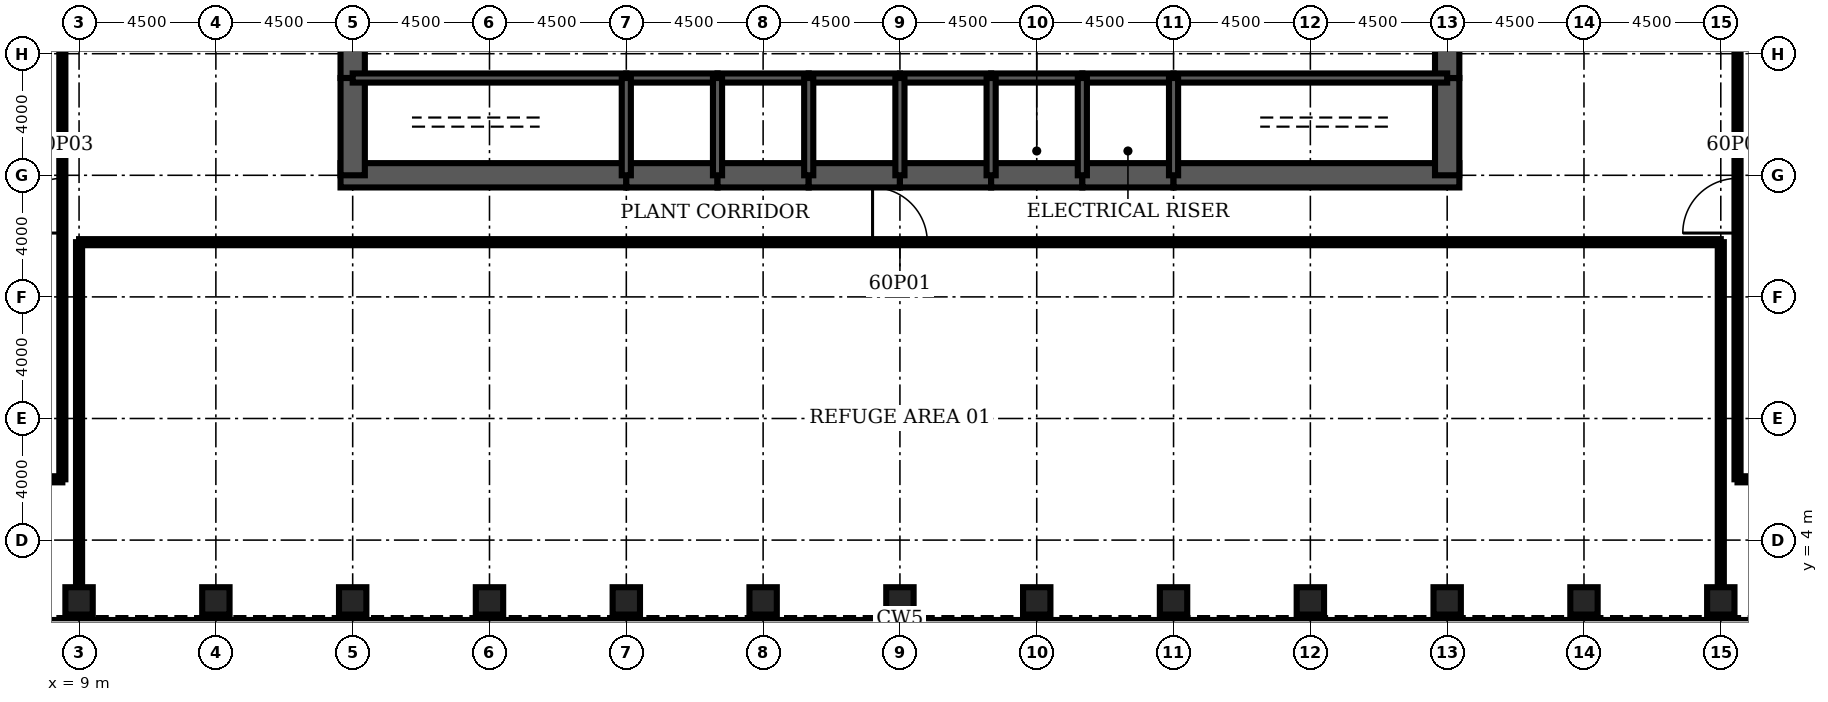
"""IFC4 building model, lengths in metres.
Left out: names, types, materials, properties, quantities, classifications, styles, units other than length and angle.
Written with IfcOpenShell. Run it as: python <this file> out.ifc"""

import sys

from ifc_helpers import new_model, si_unit, direction, frame, frame_2d, origin, origin_2d, place, context, subcontext, project, spatial, rectangle, hollow_rectangle, extrude, element, fill, save


model = new_model("IFC4")
c1 = context("Model", 3, precision=1e-05, world=origin(), true_north=direction((0.0, 1.0)))
c2 = subcontext(c1, "Body", "Model", "MODEL_VIEW")
j1 = project(units=[si_unit("LENGTHUNIT", "METRE"), si_unit("PLANEANGLEUNIT", "RADIAN")], contexts=[c1])
p1 = place(None, origin())
s1 = spatial("IfcSite", under=j1, at=p1, CompositionType="ELEMENT")
p2 = place(p1, origin())
s2 = spatial("IfcBuilding", under=s1, at=p2, CompositionType="ELEMENT")
p3 = place(p2, frame((0.0, 0.0, 265.6)))
s3 = spatial("IfcBuildingStorey", under=s2, at=p3, CompositionType="ELEMENT", Elevation=265.6)
for number, where, z_axis, x_axis in (
    (1, (9.0, 2.0, 0.0), (0.0, 0.0, 1.0), (0.0, 1.0, 0.0)),
    (2, (13.5, 2.0, 0.0), (0.0, 0.0, 1.0), (0.0, 1.0, 0.0)),
    (3, (18.0, 2.0, 0.0), (0.0, 0.0, 1.0), (0.0, 1.0, 0.0)),
    (4, (22.5, 2.0, 0.0), (0.0, 0.0, 1.0), (0.0, 1.0, 0.0)),
    (5, (27.0, 2.0, 0.0), (0.0, 0.0, 1.0), (0.0, 1.0, 0.0)),
    (6, (31.5, 2.0, 0.0), (0.0, 0.0, 1.0), (0.0, 1.0, 0.0)),
    (7, (36.0, 2.0, 0.0), (0.0, 0.0, 1.0), (0.0, 1.0, 0.0)),
    (8, (40.5, 2.0, 0.0), (0.0, 0.0, 1.0), (0.0, 1.0, 0.0)),
    (9, (45.0, 2.0, 0.0), (0.0, 0.0, 1.0), (0.0, 1.0, 0.0)),
    (10, (49.5, 2.0, 0.0), (0.0, 0.0, 1.0), (0.0, 1.0, 0.0)),
    (11, (54.0, 2.0, 0.0), (0.0, 0.0, 1.0), (0.0, 1.0, 0.0)),
    (12, (58.5, 2.0, 0.0), (0.0, 0.0, 1.0), (0.0, 1.0, 0.0)),
    (13, (63.0, 2.0, 0.0), (0.0, 0.0, 1.0), (0.0, 1.0, 0.0)),
):
    element("IfcColumn", number, at=place(p3, frame(where, z_axis=z_axis, x_axis=x_axis)), inside=s3, PredefinedType="COLUMN", context=c2, shape_type="SweptSolid", body=[
        extrude(hollow_rectangle(XDim=0.9, YDim=0.9, WallThickness=0.07, at=origin_2d()), origin(), (0.0, 0.0, 1.0), 5.5),
    ])
p4 = place(p3, frame((17.6, 16.0, 0.0), z_axis=(0.0, 0.0, 1.0), x_axis=(1.0, 0.0, 0.0)))
e14 = element("IfcWall", 14, at=p4, inside=s3, PredefinedType="SHEAR", context=c2, shape_type="SweptSolid", body=[
    extrude(rectangle(XDim=9.4, YDim=0.8, at=frame_2d((4.7, 0.0))), origin(), (0.0, 0.0, 1.0), 5.5),
])
for number, where, z_axis, x_axis in (
    (15, (27.0, 16.0, 0.0), (0.0, 0.0, 1.0), (1.0, 0.0, 0.0)),
    (16, (30.0, 16.0, 0.0), (0.0, 0.0, 1.0), (1.0, 0.0, 0.0)),
    (17, (33.0, 16.0, 0.0), (0.0, 0.0, 1.0), (1.0, 0.0, 0.0)),
    (18, (36.0, 16.0, 0.0), (0.0, 0.0, 1.0), (1.0, 0.0, 0.0)),
    (19, (39.0, 16.0, 0.0), (0.0, 0.0, 1.0), (1.0, 0.0, 0.0)),
    (20, (42.0, 16.0, 0.0), (0.0, 0.0, 1.0), (1.0, 0.0, 0.0)),
):
    element("IfcWall", number, at=place(p3, frame(where, z_axis=z_axis, x_axis=x_axis)), inside=s3, PredefinedType="SHEAR", context=c2, shape_type="SweptSolid", body=[
        extrude(rectangle(XDim=3.0, YDim=0.8, at=frame_2d((1.5, 0.0))), origin(), (0.0, 0.0, 1.0), 5.5),
    ])
p5 = place(p3, frame((45.0, 16.0, 0.0), z_axis=(0.0, 0.0, 1.0), x_axis=(1.0, 0.0, 0.0)))
e21 = element("IfcWall", 21, at=p5, inside=s3, PredefinedType="SHEAR", context=c2, shape_type="SweptSolid", body=[
    extrude(rectangle(XDim=9.4, YDim=0.8, at=frame_2d((4.7, 0.0))), origin(), (0.0, 0.0, 1.0), 5.5),
])
p6 = place(p3, frame((18.0, 22.0, 0.0), z_axis=(0.0, 0.0, 1.0), x_axis=(0.0, -1.0, 0.0)))
e22 = element("IfcWall", 22, at=p6, inside=s3, PredefinedType="SHEAR", context=c2, shape_type="SweptSolid", body=[
    extrude(rectangle(XDim=2.8, YDim=0.8, at=frame_2d((1.4, 0.0))), origin(), (0.0, 0.0, 1.0), 5.5),
])
p7 = place(p6, frame((0.6, 0.0, 0.0)))
e23 = element("IfcOpeningElement", 23, at=p7, cuts=e22, PredefinedType="OPENING", context=c2, shape_type="SweptSolid", body=[
    extrude(rectangle(XDim=1.8, YDim=2.1, at=frame_2d((0.9, 1.05))), frame((0.0, 0.41, 0.0), z_axis=(0.0, -1.0, 0.0), x_axis=(1.0, 0.0, 0.0)), (0.0, 0.0, 1.0), 0.82),
])
for number, where, z_axis, x_axis in (
    (24, (18.0, 19.2, 0.0), (0.0, 0.0, 1.0), (0.0, -1.0, 0.0)),
    (25, (54.0, 16.0, 0.0), (0.0, 0.0, 1.0), (0.0, 1.0, 0.0)),
):
    element("IfcWall", number, at=place(p3, frame(where, z_axis=z_axis, x_axis=x_axis)), inside=s3, PredefinedType="SHEAR", context=c2, shape_type="SweptSolid", body=[
        extrude(rectangle(XDim=3.2, YDim=0.8, at=frame_2d((1.6, 0.0))), origin(), (0.0, 0.0, 1.0), 5.5),
    ])
p8 = place(p3, frame((54.0, 19.2, 0.0), z_axis=(0.0, 0.0, 1.0), x_axis=(0.0, 1.0, 0.0)))
e26 = element("IfcWall", 26, at=p8, inside=s3, PredefinedType="SHEAR", context=c2, shape_type="SweptSolid", body=[
    extrude(rectangle(XDim=2.8, YDim=0.8, at=frame_2d((1.4, 0.0))), origin(), (0.0, 0.0, 1.0), 5.5),
])
p9 = place(p8, frame((0.4, 0.0, 0.0)))
e27 = element("IfcOpeningElement", 27, at=p9, cuts=e26, PredefinedType="OPENING", context=c2, shape_type="SweptSolid", body=[
    extrude(rectangle(XDim=1.8, YDim=2.1, at=frame_2d((0.9, 1.05))), frame((0.0, 0.41, 0.0), z_axis=(0.0, -1.0, 0.0), x_axis=(1.0, 0.0, 0.0)), (0.0, 0.0, 1.0), 0.82),
])
p10 = place(p3, frame((18.0, 19.2, 0.0), z_axis=(0.0, 0.0, 1.0), x_axis=(1.0, 0.0, 0.0)))
e28 = element("IfcWall", 28, at=p10, inside=s3, PredefinedType="SOLIDWALL", context=c2, shape_type="SweptSolid", body=[
    extrude(rectangle(XDim=9.0, YDim=0.3, at=frame_2d((4.5, 0.0))), origin(), (0.0, 0.0, 1.0), 5.5),
])
p11 = place(p10, frame((0.65, 0.0, 0.0)))
e29 = element("IfcOpeningElement", 29, at=p11, cuts=e28, PredefinedType="OPENING", context=c2, shape_type="SweptSolid", body=[
    extrude(rectangle(XDim=1.0, YDim=2.1, at=frame_2d((0.5, 1.05))), frame((0.0, 0.16, 0.0), z_axis=(0.0, -1.0, 0.0), x_axis=(1.0, 0.0, 0.0)), (0.0, 0.0, 1.0), 0.32),
])
p12 = place(p3, frame((27.0, 19.2, 0.0), z_axis=(0.0, 0.0, 1.0), x_axis=(1.0, 0.0, 0.0)))
e30 = element("IfcWall", 30, at=p12, inside=s3, PredefinedType="SOLIDWALL", context=c2, shape_type="SweptSolid", body=[
    extrude(rectangle(XDim=3.0, YDim=0.3, at=frame_2d((1.5, 0.0))), origin(), (0.0, 0.0, 1.0), 5.5),
])
p13 = place(p12, frame((0.95, 0.0, 0.0)))
e31 = element("IfcOpeningElement", 31, at=p13, cuts=e30, PredefinedType="OPENING", context=c2, shape_type="SweptSolid", body=[
    extrude(rectangle(XDim=1.1, YDim=2.2, at=frame_2d((0.55, 1.1))), frame((0.0, 0.16, 0.0), z_axis=(0.0, -1.0, 0.0), x_axis=(1.0, 0.0, 0.0)), (0.0, 0.0, 1.0), 0.32),
])
for number, where, z_axis, x_axis in (
    (32, (30.0, 19.2, 0.0), (0.0, 0.0, 1.0), (1.0, 0.0, 0.0)),
    (33, (33.0, 19.2, 0.0), (0.0, 0.0, 1.0), (1.0, 0.0, 0.0)),
    (34, (36.0, 19.2, 0.0), (0.0, 0.0, 1.0), (1.0, 0.0, 0.0)),
):
    element("IfcWall", number, at=place(p3, frame(where, z_axis=z_axis, x_axis=x_axis)), inside=s3, PredefinedType="SOLIDWALL", context=c2, shape_type="SweptSolid", body=[
        extrude(rectangle(XDim=3.0, YDim=0.3, at=frame_2d((1.5, 0.0))), origin(), (0.0, 0.0, 1.0), 5.5),
    ])
p14 = place(p3, frame((39.0, 19.2, 0.0), z_axis=(0.0, 0.0, 1.0), x_axis=(1.0, 0.0, 0.0)))
e35 = element("IfcWall", 35, at=p14, inside=s3, PredefinedType="SOLIDWALL", context=c2, shape_type="SweptSolid", body=[
    extrude(rectangle(XDim=3.0, YDim=0.3, at=frame_2d((1.5, 0.0))), origin(), (0.0, 0.0, 1.0), 5.5),
])
p15 = place(p14, frame((1.0, 0.0, 0.0)))
e36 = element("IfcOpeningElement", 36, at=p15, cuts=e35, PredefinedType="OPENING", context=c2, shape_type="SweptSolid", body=[
    extrude(rectangle(XDim=1.0, YDim=2.1, at=frame_2d((0.5, 1.05))), frame((0.0, 0.16, 0.0), z_axis=(0.0, -1.0, 0.0), x_axis=(1.0, 0.0, 0.0)), (0.0, 0.0, 1.0), 0.32),
])
p16 = place(p3, frame((42.0, 19.2, 0.0), z_axis=(0.0, 0.0, 1.0), x_axis=(1.0, 0.0, 0.0)))
e37 = element("IfcWall", 37, at=p16, inside=s3, PredefinedType="SOLIDWALL", context=c2, shape_type="SweptSolid", body=[
    extrude(rectangle(XDim=3.0, YDim=0.3, at=frame_2d((1.5, 0.0))), origin(), (0.0, 0.0, 1.0), 5.5),
])
p17 = place(p16, frame((1.0, 0.0, 0.0)))
e38 = element("IfcOpeningElement", 38, at=p17, cuts=e37, PredefinedType="OPENING", context=c2, shape_type="SweptSolid", body=[
    extrude(rectangle(XDim=1.0, YDim=2.1, at=frame_2d((0.5, 1.05))), frame((0.0, 0.16, 0.0), z_axis=(0.0, -1.0, 0.0), x_axis=(1.0, 0.0, 0.0)), (0.0, 0.0, 1.0), 0.32),
])
p18 = place(p3, frame((45.0, 19.2, 0.0), z_axis=(0.0, 0.0, 1.0), x_axis=(1.0, 0.0, 0.0)))
e39 = element("IfcWall", 39, at=p18, inside=s3, PredefinedType="SOLIDWALL", context=c2, shape_type="SweptSolid", body=[
    extrude(rectangle(XDim=9.0, YDim=0.3, at=frame_2d((4.5, 0.0))), origin(), (0.0, 0.0, 1.0), 5.5),
])
p19 = place(p18, frame((7.35, 0.0, 0.0)))
e40 = element("IfcOpeningElement", 40, at=p19, cuts=e39, PredefinedType="OPENING", context=c2, shape_type="SweptSolid", body=[
    extrude(rectangle(XDim=1.0, YDim=2.1, at=frame_2d((0.5, 1.05))), frame((0.0, 0.16, 0.0), z_axis=(0.0, -1.0, 0.0), x_axis=(1.0, 0.0, 0.0)), (0.0, 0.0, 1.0), 0.32),
])
for number, where, z_axis, x_axis in (
    (41, (27.0, 16.0, 0.0), (0.0, 0.0, 1.0), (0.0, 1.0, 0.0)),
    (42, (30.0, 16.0, 0.0), (0.0, 0.0, 1.0), (0.0, 1.0, 0.0)),
    (43, (33.0, 16.0, 0.0), (0.0, 0.0, 1.0), (0.0, 1.0, 0.0)),
    (44, (36.0, 16.0, 0.0), (0.0, 0.0, 1.0), (0.0, 1.0, 0.0)),
    (45, (39.0, 16.0, 0.0), (0.0, 0.0, 1.0), (0.0, 1.0, 0.0)),
    (46, (42.0, 16.0, 0.0), (0.0, 0.0, 1.0), (0.0, 1.0, 0.0)),
    (47, (45.0, 16.0, 0.0), (0.0, 0.0, 1.0), (0.0, 1.0, 0.0)),
):
    element("IfcWall", number, at=place(p3, frame(where, z_axis=z_axis, x_axis=x_axis)), inside=s3, PredefinedType="SOLIDWALL", context=c2, shape_type="SweptSolid", body=[
        extrude(rectangle(XDim=3.2, YDim=0.3, at=frame_2d((1.6, 0.0))), origin(), (0.0, 0.0, 1.0), 5.5),
    ])
p20 = place(p3, frame((39.15, 17.35, 0.0), z_axis=(0.0, 0.0, 1.0), x_axis=(1.0, 0.0, 0.0)))
e48 = element("IfcWall", 48, at=p20, inside=s3, PredefinedType="SOLIDWALL", context=c2, shape_type="SweptSolid", body=[
    extrude(rectangle(XDim=2.7, YDim=0.3, at=frame_2d((1.35, 0.0))), origin(), (0.0, 0.0, 1.0), 5.34),
])
p21 = place(p20, frame((0.85, 0.0, 0.0)))
e49 = element("IfcOpeningElement", 49, at=p21, cuts=e48, PredefinedType="OPENING", context=c2, shape_type="SweptSolid", body=[
    extrude(rectangle(XDim=1.0, YDim=2.1, at=frame_2d((0.5, 1.05))), frame((0.0, 0.16, 0.0), z_axis=(0.0, -1.0, 0.0), x_axis=(1.0, 0.0, 0.0)), (0.0, 0.0, 1.0), 0.32),
])
p22 = place(p3, frame((42.15, 17.35, 0.0), z_axis=(0.0, 0.0, 1.0), x_axis=(1.0, 0.0, 0.0)))
e50 = element("IfcWall", 50, at=p22, inside=s3, PredefinedType="SOLIDWALL", context=c2, shape_type="SweptSolid", body=[
    extrude(rectangle(XDim=2.7, YDim=0.3, at=frame_2d((1.35, 0.0))), origin(), (0.0, 0.0, 1.0), 5.34),
])
p23 = place(p22, frame((0.85, 0.0, 0.0)))
e51 = element("IfcOpeningElement", 51, at=p23, cuts=e50, PredefinedType="OPENING", context=c2, shape_type="SweptSolid", body=[
    extrude(rectangle(XDim=1.0, YDim=2.1, at=frame_2d((0.5, 1.05))), frame((0.0, 0.16, 0.0), z_axis=(0.0, -1.0, 0.0), x_axis=(1.0, 0.0, 0.0)), (0.0, 0.0, 1.0), 0.32),
])
p24 = place(p3, frame((2.7, 6.0, 0.0), z_axis=(0.0, 0.0, 1.0), x_axis=(1.0, 0.0, 0.0)))
e52 = element("IfcWall", 52, at=p24, inside=s3, PredefinedType="PARTITIONING", context=c2, shape_type="SweptSolid", body=[
    extrude(rectangle(XDim=5.75, YDim=0.2, at=frame_2d((2.875, 0.0))), origin(), (0.0, 0.0, 1.0), 5.34),
])
p25 = place(p3, frame((63.55, 6.0, 0.0), z_axis=(0.0, 0.0, 1.0), x_axis=(1.0, 0.0, 0.0)))
e53 = element("IfcWall", 53, at=p25, inside=s3, PredefinedType="PARTITIONING", context=c2, shape_type="SweptSolid", body=[
    extrude(rectangle(XDim=3.95, YDim=0.2, at=frame_2d((1.975, 0.0))), origin(), (0.0, 0.0, 1.0), 5.34),
])
p26 = place(p3, frame((9.0, 13.8, 0.0), z_axis=(0.0, 0.0, 1.0), x_axis=(1.0, 0.0, 0.0)))
e54 = element("IfcWall", 54, at=p26, inside=s3, PredefinedType="PARTITIONING", context=c2, shape_type="SweptSolid", body=[
    extrude(rectangle(XDim=54.0, YDim=0.2, at=frame_2d((27.0, 0.0))), origin(), (0.0, 0.0, 1.0), 5.34),
])
p27 = place(p26, frame((26.1, 0.0, 0.0)))
e55 = element("IfcOpeningElement", 55, at=p27, cuts=e54, PredefinedType="OPENING", context=c2, shape_type="SweptSolid", body=[
    extrude(rectangle(XDim=1.8, YDim=2.1, at=frame_2d((0.9, 1.05))), frame((0.0, 0.11, 0.0), z_axis=(0.0, -1.0, 0.0), x_axis=(1.0, 0.0, 0.0)), (0.0, 0.0, 1.0), 0.22),
])
p28 = place(p3, frame((8.45, 6.0, 0.0), z_axis=(0.0, 0.0, 1.0), x_axis=(0.0, 1.0, 0.0)))
e56 = element("IfcWall", 56, at=p28, inside=s3, PredefinedType="PARTITIONING", context=c2, shape_type="SweptSolid", body=[
    extrude(rectangle(XDim=34.0, YDim=0.2, at=frame_2d((17.0, 0.0))), origin(), (0.0, 0.0, 1.0), 5.34),
])
p29 = place(p28, frame((8.1, 0.0, 0.0)))
e57 = element("IfcOpeningElement", 57, at=p29, cuts=e56, PredefinedType="OPENING", context=c2, shape_type="SweptSolid", body=[
    extrude(rectangle(XDim=1.8, YDim=2.1, at=frame_2d((0.9, 1.05))), frame((0.0, 0.11, 0.0), z_axis=(0.0, -1.0, 0.0), x_axis=(1.0, 0.0, 0.0)), (0.0, 0.0, 1.0), 0.22),
])
p30 = place(p28, frame((23.1, 0.0, 0.0)))
e58 = element("IfcOpeningElement", 58, at=p30, cuts=e56, PredefinedType="OPENING", context=c2, shape_type="SweptSolid", body=[
    extrude(rectangle(XDim=1.8, YDim=2.1, at=frame_2d((0.9, 1.05))), frame((0.0, 0.11, 0.0), z_axis=(0.0, -1.0, 0.0), x_axis=(1.0, 0.0, 0.0)), (0.0, 0.0, 1.0), 0.22),
])
p31 = place(p28, frame((31.5, 0.0, 0.0)))
e59 = element("IfcOpeningElement", 59, at=p31, cuts=e56, PredefinedType="OPENING", context=c2, shape_type="SweptSolid", body=[
    extrude(rectangle(XDim=1.0, YDim=2.1, at=frame_2d((0.5, 1.05))), frame((0.0, 0.11, 0.0), z_axis=(0.0, -1.0, 0.0), x_axis=(1.0, 0.0, 0.0)), (0.0, 0.0, 1.0), 0.22),
])
for number, where, z_axis, x_axis in (
    (60, (9.0, 2.45, 0.0), (0.0, 0.0, 1.0), (0.0, 1.0, 0.0)),
    (61, (63.0, 2.45, 0.0), (0.0, 0.0, 1.0), (0.0, 1.0, 0.0)),
):
    element("IfcWall", number, at=place(p3, frame(where, z_axis=z_axis, x_axis=x_axis)), inside=s3, PredefinedType="PARTITIONING", context=c2, shape_type="SweptSolid", body=[
        extrude(rectangle(XDim=11.35, YDim=0.2, at=frame_2d((5.675, 0.0))), origin(), (0.0, 0.0, 1.0), 5.34),
    ])
p32 = place(p3, frame((63.55, 6.0, 0.0), z_axis=(0.0, 0.0, 1.0), x_axis=(0.0, 1.0, 0.0)))
e62 = element("IfcWall", 62, at=p32, inside=s3, PredefinedType="PARTITIONING", context=c2, shape_type="SweptSolid", body=[
    extrude(rectangle(XDim=34.0, YDim=0.2, at=frame_2d((17.0, 0.0))), origin(), (0.0, 0.0, 1.0), 5.34),
])
p33 = place(p32, frame((8.1, 0.0, 0.0)))
e63 = element("IfcOpeningElement", 63, at=p33, cuts=e62, PredefinedType="OPENING", context=c2, shape_type="SweptSolid", body=[
    extrude(rectangle(XDim=1.8, YDim=2.1, at=frame_2d((0.9, 1.05))), frame((0.0, 0.11, 0.0), z_axis=(0.0, -1.0, 0.0), x_axis=(1.0, 0.0, 0.0)), (0.0, 0.0, 1.0), 0.22),
])
p34 = place(p32, frame((19.5, 0.0, 0.0)))
e64 = element("IfcOpeningElement", 64, at=p34, cuts=e62, PredefinedType="OPENING", context=c2, shape_type="SweptSolid", body=[
    extrude(rectangle(XDim=1.0, YDim=2.1, at=frame_2d((0.5, 1.05))), frame((0.0, 0.11, 0.0), z_axis=(0.0, -1.0, 0.0), x_axis=(1.0, 0.0, 0.0)), (0.0, 0.0, 1.0), 0.22),
])
p35 = place(p32, frame((25.1, 0.0, 0.0)))
e65 = element("IfcOpeningElement", 65, at=p35, cuts=e62, PredefinedType="OPENING", context=c2, shape_type="SweptSolid", body=[
    extrude(rectangle(XDim=1.8, YDim=2.1, at=frame_2d((0.9, 1.05))), frame((0.0, 0.11, 0.0), z_axis=(0.0, -1.0, 0.0), x_axis=(1.0, 0.0, 0.0)), (0.0, 0.0, 1.0), 0.22),
])
p36 = place(p32, frame((31.5, 0.0, 0.0)))
e66 = element("IfcOpeningElement", 66, at=p36, cuts=e62, PredefinedType="OPENING", context=c2, shape_type="SweptSolid", body=[
    extrude(rectangle(XDim=1.0, YDim=2.1, at=frame_2d((0.5, 1.05))), frame((0.0, 0.11, 0.0), z_axis=(0.0, -1.0, 0.0), x_axis=(1.0, 0.0, 0.0)), (0.0, 0.0, 1.0), 0.22),
])
p37 = place(p21, origin())
e67 = element("IfcDoor", 67, at=p37, inside=s3, OperationType="SINGLE_SWING_LEFT", PredefinedType="DOOR", context=c2, shape_type="SweptSolid", body=[
    extrude(rectangle(XDim=1.0, YDim=2.1, at=frame_2d((0.5, 1.05))), frame((0.0, 0.025, 0.0), z_axis=(0.0, -1.0, 0.0), x_axis=(1.0, 0.0, 0.0)), (0.0, 0.0, 1.0), 0.05),
])
fill(e49, e67)
p38 = place(p23, origin())
e68 = element("IfcDoor", 68, at=p38, inside=s3, OperationType="SINGLE_SWING_LEFT", PredefinedType="DOOR", context=c2, shape_type="SweptSolid", body=[
    extrude(rectangle(XDim=1.0, YDim=2.1, at=frame_2d((0.5, 1.05))), frame((0.0, 0.025, 0.0), z_axis=(0.0, -1.0, 0.0), x_axis=(1.0, 0.0, 0.0)), (0.0, 0.0, 1.0), 0.05),
])
fill(e51, e68)
p39 = place(p27, origin())
e69 = element("IfcDoor", 69, at=p39, inside=s3, OperationType="SINGLE_SWING_LEFT", PredefinedType="DOOR", context=c2, shape_type="SweptSolid", body=[
    extrude(rectangle(XDim=1.8, YDim=2.1, at=frame_2d((0.9, 1.05))), frame((0.0, 0.025, 0.0), z_axis=(0.0, -1.0, 0.0), x_axis=(1.0, 0.0, 0.0)), (0.0, 0.0, 1.0), 0.05),
])
fill(e55, e69)
p40 = place(p33, origin())
e70 = element("IfcDoor", 70, at=p40, inside=s3, OperationType="SINGLE_SWING_LEFT", PredefinedType="DOOR", context=c2, shape_type="SweptSolid", body=[
    extrude(rectangle(XDim=1.8, YDim=2.1, at=frame_2d((0.9, 1.05))), frame((0.0, 0.025, 0.0), z_axis=(0.0, -1.0, 0.0), x_axis=(1.0, 0.0, 0.0)), (0.0, 0.0, 1.0), 0.05),
])
fill(e63, e70)
p41 = place(p29, origin())
e71 = element("IfcDoor", 71, at=p41, inside=s3, OperationType="SINGLE_SWING_LEFT", PredefinedType="DOOR", context=c2, shape_type="SweptSolid", body=[
    extrude(rectangle(XDim=1.8, YDim=2.1, at=frame_2d((0.9, 1.05))), frame((0.0, 0.025, 0.0), z_axis=(0.0, -1.0, 0.0), x_axis=(1.0, 0.0, 0.0)), (0.0, 0.0, 1.0), 0.05),
])
fill(e57, e71)
p42 = place(p13, origin())
e72 = element("IfcDoor", 72, at=p42, inside=s3, OperationType="DOUBLE_DOOR_SLIDING", PredefinedType="USERDEFINED", context=c2, shape_type="SweptSolid", body=[
    extrude(rectangle(XDim=1.1, YDim=2.2, at=frame_2d((0.55, 1.1))), frame((0.0, 0.025, 0.0), z_axis=(0.0, -1.0, 0.0), x_axis=(1.0, 0.0, 0.0)), (0.0, 0.0, 1.0), 0.05),
])
fill(e31, e72)
p43 = place(p11, origin())
e73 = element("IfcDoor", 73, at=p43, inside=s3, OperationType="SINGLE_SWING_LEFT", PredefinedType="DOOR", context=c2, shape_type="SweptSolid", body=[
    extrude(rectangle(XDim=1.0, YDim=2.1, at=frame_2d((0.5, 1.05))), frame((0.0, 0.025, 0.0), z_axis=(0.0, -1.0, 0.0), x_axis=(1.0, 0.0, 0.0)), (0.0, 0.0, 1.0), 0.05),
])
fill(e29, e73)
p44 = place(p19, origin())
e74 = element("IfcDoor", 74, at=p44, inside=s3, OperationType="SINGLE_SWING_RIGHT", PredefinedType="DOOR", context=c2, shape_type="SweptSolid", body=[
    extrude(rectangle(XDim=1.0, YDim=2.1, at=frame_2d((0.5, 1.05))), frame((0.0, 0.025, 0.0), z_axis=(0.0, -1.0, 0.0), x_axis=(1.0, 0.0, 0.0)), (0.0, 0.0, 1.0), 0.05),
])
fill(e40, e74)
p45 = place(p7, origin())
e75 = element("IfcDoor", 75, at=p45, inside=s3, OperationType="SINGLE_SWING_LEFT", PredefinedType="DOOR", context=c2, shape_type="SweptSolid", body=[
    extrude(rectangle(XDim=1.8, YDim=2.1, at=frame_2d((0.9, 1.05))), frame((0.0, 0.4, 0.0), z_axis=(0.0, -1.0, 0.0), x_axis=(1.0, 0.0, 0.0)), (0.0, 0.0, 1.0), 0.8),
])
fill(e23, e75)
p46 = place(p9, origin())
e76 = element("IfcDoor", 76, at=p46, inside=s3, OperationType="SINGLE_SWING_LEFT", PredefinedType="DOOR", context=c2, shape_type="SweptSolid", body=[
    extrude(rectangle(XDim=1.8, YDim=2.1, at=frame_2d((0.9, 1.05))), frame((0.0, 0.4, 0.0), z_axis=(0.0, -1.0, 0.0), x_axis=(1.0, 0.0, 0.0)), (0.0, 0.0, 1.0), 0.8),
])
fill(e27, e76)
p47 = place(p15, origin())
e77 = element("IfcDoor", 77, at=p47, inside=s3, OperationType="SINGLE_SWING_LEFT", PredefinedType="DOOR", context=c2, shape_type="SweptSolid", body=[
    extrude(rectangle(XDim=1.0, YDim=2.1, at=frame_2d((0.5, 1.05))), frame((0.0, 0.025, 0.0), z_axis=(0.0, -1.0, 0.0), x_axis=(1.0, 0.0, 0.0)), (0.0, 0.0, 1.0), 0.05),
])
fill(e36, e77)
p48 = place(p17, origin())
e78 = element("IfcDoor", 78, at=p48, inside=s3, OperationType="SINGLE_SWING_LEFT", PredefinedType="DOOR", context=c2, shape_type="SweptSolid", body=[
    extrude(rectangle(XDim=1.0, YDim=2.1, at=frame_2d((0.5, 1.05))), frame((0.0, 0.025, 0.0), z_axis=(0.0, -1.0, 0.0), x_axis=(1.0, 0.0, 0.0)), (0.0, 0.0, 1.0), 0.05),
])
fill(e38, e78)
save(model, sys.argv[1])
